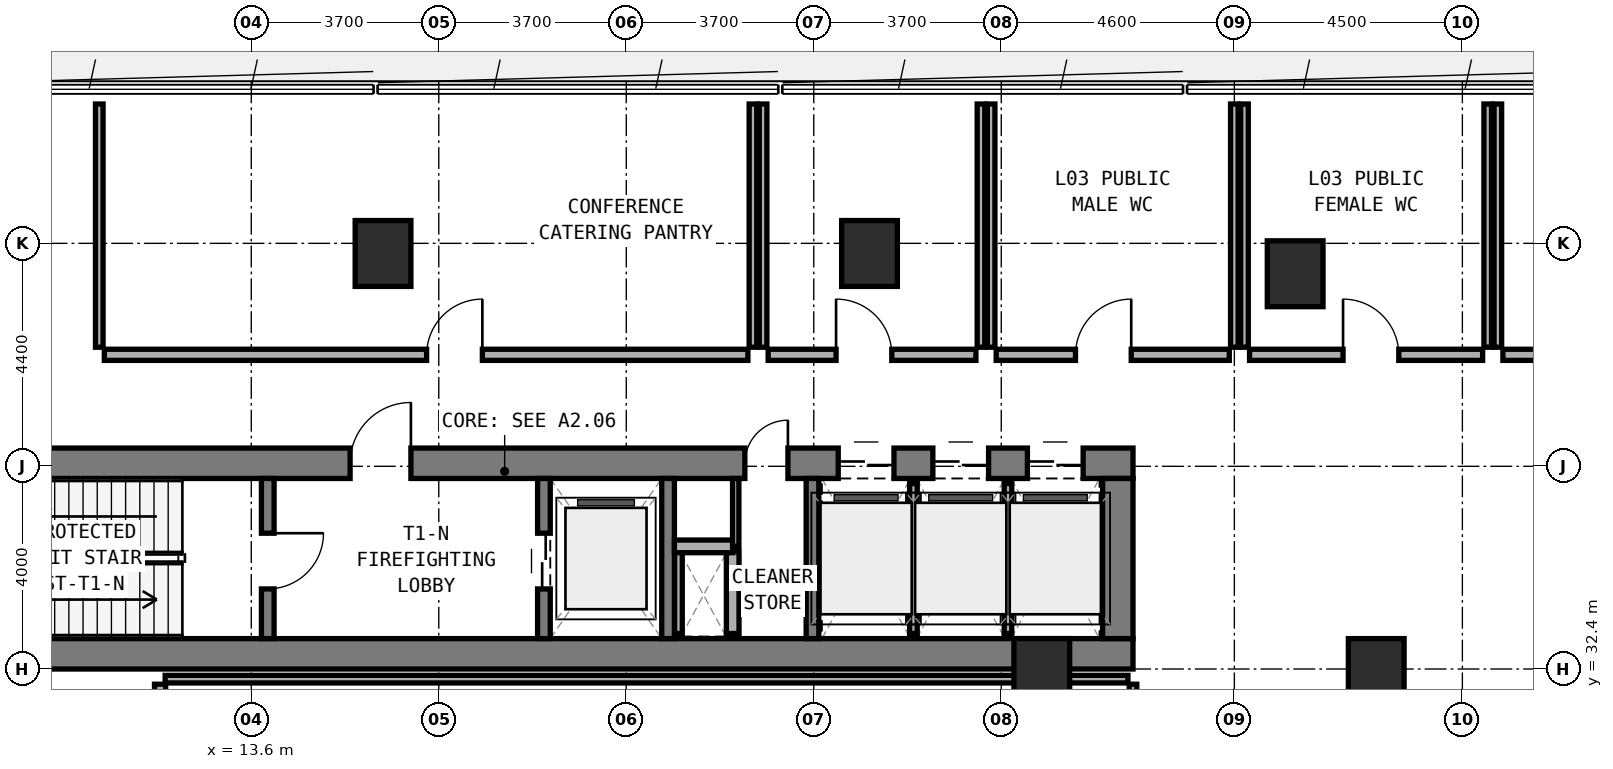
"""IFC4 building model, lengths in metres.
Left out: names, types, materials, properties, quantities, classifications, styles, units other than length and angle.
Written with IfcOpenShell. Run it as: python <this file> out.ifc"""

import sys

from ifc_helpers import new_model, si_unit, direction, frame, frame_2d, origin, origin_2d, place, context, subcontext, project, spatial, rectangle, extrude, element, fill, save


model = new_model("IFC4")
c1 = context("Model", 3, precision=1e-05, world=origin(), true_north=direction((0.0, 1.0)))
c2 = subcontext(c1, "Body", "Model", "MODEL_VIEW")
j1 = project(units=[si_unit("LENGTHUNIT", "METRE"), si_unit("PLANEANGLEUNIT", "RADIAN")], contexts=[c1])
p1 = place(None, origin())
s1 = spatial("IfcSite", under=j1, at=p1, CompositionType="ELEMENT")
p2 = place(p1, origin())
s2 = spatial("IfcBuilding", under=s1, at=p2, CompositionType="ELEMENT")
p3 = place(p2, frame((0.0, 0.0, 15.0)))
s3 = spatial("IfcBuildingStorey", under=s2, at=p3, CompositionType="ELEMENT", Elevation=15.0)
p4 = place(p3, frame((6.2, 32.7, 0.0), z_axis=(0.0, 0.0, 1.0), x_axis=(1.0, 0.0, 0.0)))
e1 = element("IfcWall", 1, at=p4, inside=s3, PredefinedType="SHEAR", context=c2, shape_type="SweptSolid", body=[
    extrude(rectangle(XDim=24.8, YDim=0.6, at=frame_2d((12.4, 0.0))), origin(), (0.0, 0.0, 1.0), 4.5),
])
p5 = place(p3, frame((6.2, 36.46, 0.0), z_axis=(0.0, 0.0, 1.0), x_axis=(1.0, 0.0, 0.0)))
e2 = element("IfcWall", 2, at=p5, inside=s3, PredefinedType="SHEAR", context=c2, shape_type="SweptSolid", body=[
    extrude(rectangle(XDim=24.8, YDim=0.6, at=frame_2d((12.4, 0.0))), origin(), (0.0, 0.0, 1.0), 4.5),
])
p6 = place(p5, frame((9.35, 0.0, 0.0)))
e3 = element("IfcOpeningElement", 3, at=p6, cuts=e2, PredefinedType="OPENING", context=c2, shape_type="SweptSolid", body=[
    extrude(rectangle(XDim=1.2, YDim=2.15, at=frame_2d((0.6, 1.075))), frame((0.0, 0.31, 0.0), z_axis=(0.0, -1.0, 0.0), x_axis=(1.0, 0.0, 0.0)), (0.0, 0.0, 1.0), 0.62),
])
p7 = place(p5, frame((17.14, 0.0, 0.0)))
e4 = element("IfcOpeningElement", 4, at=p7, cuts=e2, PredefinedType="OPENING", context=c2, shape_type="SweptSolid", body=[
    extrude(rectangle(XDim=0.85, YDim=2.1, at=frame_2d((0.425, 1.05))), frame((0.0, 0.31, 0.0), z_axis=(0.0, -1.0, 0.0), x_axis=(1.0, 0.0, 0.0)), (0.0, 0.0, 1.0), 0.62),
])
p8 = place(p5, frame((18.983, 0.0, 0.0)))
e5 = element("IfcOpeningElement", 5, at=p8, cuts=e2, PredefinedType="OPENING", context=c2, shape_type="SweptSolid", body=[
    extrude(rectangle(XDim=1.1, YDim=2.15, at=frame_2d((0.55, 1.075))), frame((0.0, 0.31, 0.0), z_axis=(0.0, -1.0, 0.0), x_axis=(1.0, 0.0, 0.0)), (0.0, 0.0, 1.0), 0.62),
])
p9 = place(p5, frame((20.85, 0.0, 0.0)))
e6 = element("IfcOpeningElement", 6, at=p9, cuts=e2, PredefinedType="OPENING", context=c2, shape_type="SweptSolid", body=[
    extrude(rectangle(XDim=1.1, YDim=2.15, at=frame_2d((0.55, 1.075))), frame((0.0, 0.31, 0.0), z_axis=(0.0, -1.0, 0.0), x_axis=(1.0, 0.0, 0.0)), (0.0, 0.0, 1.0), 0.62),
])
p10 = place(p5, frame((22.716, 0.0, 0.0)))
e7 = element("IfcOpeningElement", 7, at=p10, cuts=e2, PredefinedType="OPENING", context=c2, shape_type="SweptSolid", body=[
    extrude(rectangle(XDim=1.1, YDim=2.15, at=frame_2d((0.55, 1.075))), frame((0.0, 0.31, 0.0), z_axis=(0.0, -1.0, 0.0), x_axis=(1.0, 0.0, 0.0)), (0.0, 0.0, 1.0), 0.62),
])
p11 = place(p3, frame((30.7, 33.0, 0.0), z_axis=(0.0, 0.0, 1.0), x_axis=(0.0, 1.0, 0.0)))
e8 = element("IfcWall", 8, at=p11, inside=s3, PredefinedType="SHEAR", context=c2, shape_type="SweptSolid", body=[
    extrude(rectangle(XDim=3.16, YDim=0.6, at=frame_2d((1.58, 0.0))), origin(), (0.0, 0.0, 1.0), 4.5),
])
p12 = place(p3, frame((13.925, 33.0, 0.0), z_axis=(0.0, 0.0, 1.0), x_axis=(0.0, 1.0, 0.0)))
e9 = element("IfcWall", 9, at=p12, inside=s3, PredefinedType="STANDARD", context=c2, shape_type="SweptSolid", body=[
    extrude(rectangle(XDim=3.16, YDim=0.25, at=frame_2d((1.58, 0.0))), origin(), (0.0, 0.0, 1.0), 4.1),
])
p13 = place(p12, frame((0.98, 0.0, 0.0)))
e10 = element("IfcOpeningElement", 10, at=p13, cuts=e9, PredefinedType="OPENING", context=c2, shape_type="SweptSolid", body=[
    extrude(rectangle(XDim=1.1, YDim=2.15, at=frame_2d((0.55, 1.075))), frame((0.0, 0.135, 0.0), z_axis=(0.0, -1.0, 0.0), x_axis=(1.0, 0.0, 0.0)), (0.0, 0.0, 1.0), 0.27),
])
p14 = place(p3, frame((19.375, 33.0, 0.0), z_axis=(0.0, 0.0, 1.0), x_axis=(0.0, 1.0, 0.0)))
e11 = element("IfcWall", 11, at=p14, inside=s3, PredefinedType="STANDARD", context=c2, shape_type="SweptSolid", body=[
    extrude(rectangle(XDim=3.16, YDim=0.25, at=frame_2d((1.58, 0.0))), origin(), (0.0, 0.0, 1.0), 4.1),
])
p15 = place(p14, frame((0.98, 0.0, 0.0)))
e12 = element("IfcOpeningElement", 12, at=p15, cuts=e11, PredefinedType="OPENING", context=c2, shape_type="SweptSolid", body=[
    extrude(rectangle(XDim=1.1, YDim=2.15, at=frame_2d((0.55, 1.075))), frame((0.0, 0.135, 0.0), z_axis=(0.0, -1.0, 0.0), x_axis=(1.0, 0.0, 0.0)), (0.0, 0.0, 1.0), 0.27),
])
for number, where, z_axis, x_axis in (
    (13, (21.825, 33.0, 0.0), (0.0, 0.0, 1.0), (0.0, 1.0, 0.0)),
    (14, (24.675, 33.0, 0.0), (0.0, 0.0, 1.0), (0.0, 1.0, 0.0)),
):
    element("IfcWall", number, at=place(p3, frame(where, z_axis=z_axis, x_axis=x_axis)), inside=s3, PredefinedType="STANDARD", context=c2, shape_type="SweptSolid", body=[
        extrude(rectangle(XDim=3.16, YDim=0.25, at=frame_2d((1.58, 0.0))), origin(), (0.0, 0.0, 1.0), 4.1),
    ])
for number, where, z_axis, x_axis in (
    (15, (16.2, 40.6, 0.0), (0.0, 0.0, 1.0), (1.0, 0.0, 0.0)),
    (16, (25.8, 40.6, 0.0), (0.0, 0.0, 1.0), (1.0, 0.0, 0.0)),
    (17, (34.2, 40.2, 0.0), (0.0, 0.0, 1.0), (1.0, 0.0, 0.0)),
    (18, (35.8, 32.35, 0.0), (0.0, 0.0, 1.0), (1.0, 0.0, 0.0)),
    (19, (29.2, 32.35, 0.0), (0.0, 0.0, 1.0), (1.0, 0.0, 0.0)),
):
    element("IfcColumn", number, at=place(p3, frame(where, z_axis=z_axis, x_axis=x_axis)), inside=s3, PredefinedType="COLUMN", context=c2, shape_type="SweptSolid", body=[
        extrude(rectangle(XDim=1.1, YDim=1.3, at=origin_2d()), origin(), (0.0, 0.0, 1.0), 4.5),
    ])
p16 = place(p3, frame((22.03, 33.1, 0.0), z_axis=(0.0, 0.0, 1.0), x_axis=(0.0, 1.0, 0.0)))
e20 = element("IfcWall", 20, at=p16, inside=s3, PredefinedType="PARTITIONING", context=c2, shape_type="SweptSolid", body=[
    extrude(rectangle(XDim=1.62, YDim=0.15, at=frame_2d((0.81, 0.0))), origin(), (0.0, 0.0, 1.0), 4.1),
])
p17 = place(p3, frame((23.1, 33.1, 0.0), z_axis=(0.0, 0.0, 1.0), x_axis=(0.0, 1.0, 0.0)))
e21 = element("IfcWall", 21, at=p17, inside=s3, PredefinedType="SOLIDWALL", context=c2, shape_type="SweptSolid", body=[
    extrude(rectangle(XDim=1.62, YDim=0.25, at=frame_2d((0.81, 0.0))), origin(), (0.0, 0.0, 1.0), 4.1),
])
p18 = place(p3, frame((21.95, 34.82, 0.0), z_axis=(0.0, 0.0, 1.0), x_axis=(1.0, 0.0, 0.0)))
e22 = element("IfcWall", 22, at=p18, inside=s3, PredefinedType="SOLIDWALL", context=c2, shape_type="SweptSolid", body=[
    extrude(rectangle(XDim=1.15, YDim=0.25, at=frame_2d((0.575, 0.0))), origin(), (0.0, 0.0, 1.0), 4.1),
])
p19 = place(p3, frame((23.16, 34.82, 0.0), z_axis=(0.0, 0.0, 1.0), x_axis=(0.0, 1.0, 0.0)))
e23 = element("IfcWall", 23, at=p19, inside=s3, PredefinedType="PARTITIONING", context=c2, shape_type="SweptSolid", body=[
    extrude(rectangle(XDim=1.34, YDim=0.125, at=frame_2d((0.67, 0.0))), origin(), (0.0, 0.0, 1.0), 4.1),
])
p20 = place(p3, frame((26.667, 33.1, 0.0), z_axis=(0.0, 0.0, 1.0), x_axis=(0.0, 1.0, 0.0)))
e24 = element("IfcWall", 24, at=p20, inside=s3, PredefinedType="PARTITIONING", context=c2, shape_type="SweptSolid", body=[
    extrude(rectangle(XDim=2.96, YDim=0.15, at=frame_2d((1.48, 0.0))), origin(), (0.0, 0.0, 1.0), 4.1),
])
p21 = place(p3, frame((28.533, 33.1, 0.0), z_axis=(0.0, 0.0, 1.0), x_axis=(0.0, 1.0, 0.0)))
e25 = element("IfcWall", 25, at=p21, inside=s3, PredefinedType="PARTITIONING", context=c2, shape_type="SweptSolid", body=[
    extrude(rectangle(XDim=2.96, YDim=0.15, at=frame_2d((1.48, 0.0))), origin(), (0.0, 0.0, 1.0), 3.175),
])
p22 = place(p3, frame((31.0, 17.9, 0.0), z_axis=(0.0, 0.0, 1.0), x_axis=(0.0, 1.0, 0.0)))
e26 = element("IfcWall", 26, at=p22, inside=s3, PredefinedType="PARTITIONING", context=c2, shape_type="SweptSolid", body=[
    extrude(rectangle(XDim=14.2, YDim=0.15, at=frame_2d((7.1, 0.0))), origin(), (0.0, 0.0, 1.0), 3.175),
])
p23 = place(p3, frame((11.9, 32.2, 0.0), z_axis=(0.0, 0.0, 1.0), x_axis=(1.0, 0.0, 0.0)))
e27 = element("IfcWall", 27, at=p23, inside=s3, PredefinedType="PARTITIONING", context=c2, shape_type="SweptSolid", body=[
    extrude(rectangle(XDim=19.0, YDim=0.15, at=frame_2d((9.5, 0.0))), origin(), (0.0, 0.0, 1.0), 3.175),
])
p24 = place(p3, frame((11.8, 17.9, 0.0), z_axis=(0.0, 0.0, 1.0), x_axis=(0.0, 1.0, 0.0)))
e28 = element("IfcWall", 28, at=p24, inside=s3, PredefinedType="SOLIDWALL", context=c2, shape_type="SweptSolid", body=[
    extrude(rectangle(XDim=14.2, YDim=0.22, at=frame_2d((7.1, 0.0))), origin(), (0.0, 0.0, 1.0), 3.175),
])
p25 = place(p24, frame((5.885, 0.0, 0.0)))
e29 = element("IfcOpeningElement", 29, at=p25, cuts=e28, PredefinedType="OPENING", context=c2, shape_type="SweptSolid", body=[
    extrude(rectangle(XDim=1.1, YDim=2.1, at=frame_2d((0.55, 1.05))), frame((0.0, 0.12, 0.0), z_axis=(0.0, -1.0, 0.0), x_axis=(1.0, 0.0, 0.0)), (0.0, 0.0, 1.0), 0.24),
])
for number, where, z_axis, x_axis in (
    (30, (10.6, 38.75, 0.0), (0.0, 0.0, 1.0), (0.0, 1.0, 0.0)),
    (31, (23.5, 38.75, 0.0), (0.0, 0.0, 1.0), (0.0, 1.0, 0.0)),
):
    element("IfcWall", number, at=place(p3, frame(where, z_axis=z_axis, x_axis=x_axis)), inside=s3, PredefinedType="PARTITIONING", context=c2, shape_type="SweptSolid", body=[
        extrude(rectangle(XDim=4.8, YDim=0.15, at=frame_2d((2.4, 0.0))), origin(), (0.0, 0.0, 1.0), 3.625),
    ])
p26 = place(p3, frame((10.7, 38.6, 0.0), z_axis=(0.0, 0.0, 1.0), x_axis=(1.0, 0.0, 0.0)))
e32 = element("IfcWall", 32, at=p26, inside=s3, PredefinedType="SOLIDWALL", context=c2, shape_type="SweptSolid", body=[
    extrude(rectangle(XDim=12.7, YDim=0.22, at=frame_2d((6.35, 0.0))), origin(), (0.0, 0.0, 1.0), 4.1),
])
p27 = place(p26, frame((6.36, 0.0, 0.0)))
e33 = element("IfcOpeningElement", 33, at=p27, cuts=e32, PredefinedType="OPENING", context=c2, shape_type="SweptSolid", body=[
    extrude(rectangle(XDim=1.1, YDim=2.1, at=frame_2d((0.55, 1.05))), frame((0.0, 0.12, 0.0), z_axis=(0.0, -1.0, 0.0), x_axis=(1.0, 0.0, 0.0)), (0.0, 0.0, 1.0), 0.24),
])
for number, where, z_axis, x_axis in (
    (34, (23.7, 38.75, 0.0), (0.0, 0.0, 1.0), (0.0, 1.0, 0.0)),
    (35, (28.0, 38.75, 0.0), (0.0, 0.0, 1.0), (0.0, 1.0, 0.0)),
):
    element("IfcWall", number, at=place(p3, frame(where, z_axis=z_axis, x_axis=x_axis)), inside=s3, PredefinedType="PARTITIONING", context=c2, shape_type="SweptSolid", body=[
        extrude(rectangle(XDim=4.8, YDim=0.15, at=frame_2d((2.4, 0.0))), origin(), (0.0, 0.0, 1.0), 3.625),
    ])
p28 = place(p3, frame((23.8, 38.6, 0.0), z_axis=(0.0, 0.0, 1.0), x_axis=(1.0, 0.0, 0.0)))
e36 = element("IfcWall", 36, at=p28, inside=s3, PredefinedType="SOLIDWALL", context=c2, shape_type="SweptSolid", body=[
    extrude(rectangle(XDim=4.1, YDim=0.22, at=frame_2d((2.05, 0.0))), origin(), (0.0, 0.0, 1.0), 3.175),
])
p29 = place(p28, frame((1.34, 0.0, 0.0)))
e37 = element("IfcOpeningElement", 37, at=p29, cuts=e36, PredefinedType="OPENING", context=c2, shape_type="SweptSolid", body=[
    extrude(rectangle(XDim=1.1, YDim=2.1, at=frame_2d((0.55, 1.05))), frame((0.0, 0.12, 0.0), z_axis=(0.0, -1.0, 0.0), x_axis=(1.0, 0.0, 0.0)), (0.0, 0.0, 1.0), 0.24),
])
for number, where, z_axis, x_axis in (
    (38, (28.2, 38.75, 0.0), (0.0, 0.0, 1.0), (0.0, 1.0, 0.0)),
    (39, (33.0, 38.75, 0.0), (0.0, 0.0, 1.0), (0.0, 1.0, 0.0)),
):
    element("IfcWall", number, at=place(p3, frame(where, z_axis=z_axis, x_axis=x_axis)), inside=s3, PredefinedType="PARTITIONING", context=c2, shape_type="SweptSolid", body=[
        extrude(rectangle(XDim=4.8, YDim=0.15, at=frame_2d((2.4, 0.0))), origin(), (0.0, 0.0, 1.0), 3.625),
    ])
p30 = place(p3, frame((28.3, 38.6, 0.0), z_axis=(0.0, 0.0, 1.0), x_axis=(1.0, 0.0, 0.0)))
e40 = element("IfcWall", 40, at=p30, inside=s3, PredefinedType="SOLIDWALL", context=c2, shape_type="SweptSolid", body=[
    extrude(rectangle(XDim=4.6, YDim=0.22, at=frame_2d((2.3, 0.0))), origin(), (0.0, 0.0, 1.0), 4.1),
])
p31 = place(p30, frame((1.565, 0.0, 0.0)))
e41 = element("IfcOpeningElement", 41, at=p31, cuts=e40, PredefinedType="OPENING", context=c2, shape_type="SweptSolid", body=[
    extrude(rectangle(XDim=1.1, YDim=2.1, at=frame_2d((0.55, 1.05))), frame((0.0, 0.12, 0.0), z_axis=(0.0, -1.0, 0.0), x_axis=(1.0, 0.0, 0.0)), (0.0, 0.0, 1.0), 0.24),
])
p32 = place(p3, frame((33.2, 38.75, 0.0), z_axis=(0.0, 0.0, 1.0), x_axis=(0.0, 1.0, 0.0)))
e42 = element("IfcWall", 42, at=p32, inside=s3, PredefinedType="PARTITIONING", context=c2, shape_type="SweptSolid", body=[
    extrude(rectangle(XDim=4.8, YDim=0.15, at=frame_2d((2.4, 0.0))), origin(), (0.0, 0.0, 1.0), 3.625),
])
p33 = place(p3, frame((38.0, 38.75, 0.0), z_axis=(0.0, 0.0, 1.0), x_axis=(0.0, 1.0, 0.0)))
e43 = element("IfcWall", 43, at=p33, inside=s3, PredefinedType="PARTITIONING", context=c2, shape_type="SweptSolid", body=[
    extrude(rectangle(XDim=4.8, YDim=0.15, at=frame_2d((2.4, 0.0))), origin(), (0.0, 0.0, 1.0), 4.1),
])
p34 = place(p3, frame((33.3, 38.6, 0.0), z_axis=(0.0, 0.0, 1.0), x_axis=(1.0, 0.0, 0.0)))
e44 = element("IfcWall", 44, at=p34, inside=s3, PredefinedType="SOLIDWALL", context=c2, shape_type="SweptSolid", body=[
    extrude(rectangle(XDim=4.6, YDim=0.22, at=frame_2d((2.3, 0.0))), origin(), (0.0, 0.0, 1.0), 3.625),
])
p35 = place(p34, frame((1.845, 0.0, 0.0)))
e45 = element("IfcOpeningElement", 45, at=p35, cuts=e44, PredefinedType="OPENING", context=c2, shape_type="SweptSolid", body=[
    extrude(rectangle(XDim=1.1, YDim=2.1, at=frame_2d((0.55, 1.05))), frame((0.0, 0.12, 0.0), z_axis=(0.0, -1.0, 0.0), x_axis=(1.0, 0.0, 0.0)), (0.0, 0.0, 1.0), 0.24),
])
p36 = place(p3, frame((38.2, 38.75, 0.0), z_axis=(0.0, 0.0, 1.0), x_axis=(0.0, 1.0, 0.0)))
e46 = element("IfcWall", 46, at=p36, inside=s3, PredefinedType="PARTITIONING", context=c2, shape_type="SweptSolid", body=[
    extrude(rectangle(XDim=4.8, YDim=0.15, at=frame_2d((2.4, 0.0))), origin(), (0.0, 0.0, 1.0), 4.1),
])
p37 = place(p3, frame((38.3, 38.6, 0.0), z_axis=(0.0, 0.0, 1.0), x_axis=(1.0, 0.0, 0.0)))
e47 = element("IfcWall", 47, at=p37, inside=s3, PredefinedType="SOLIDWALL", context=c2, shape_type="SweptSolid", body=[
    extrude(rectangle(XDim=19.1, YDim=0.22, at=frame_2d((9.55, 0.0))), origin(), (0.0, 0.0, 1.0), 3.375),
])
p38 = place(p37, frame((8.09, 0.0, 0.0)))
e48 = element("IfcOpeningElement", 48, at=p38, cuts=e47, PredefinedType="OPENING", context=c2, shape_type="SweptSolid", body=[
    extrude(rectangle(XDim=1.1, YDim=2.1, at=frame_2d((0.55, 1.05))), frame((0.0, 0.12, 0.0), z_axis=(0.0, -1.0, 0.0), x_axis=(1.0, 0.0, 0.0)), (0.0, 0.0, 1.0), 0.24),
])
p39 = place(p13, frame((1.1, 0.0, 0.0), z_axis=(0.0, 0.0, 1.0), x_axis=(-1.0, 0.0, 0.0)))
e49 = element("IfcDoor", 49, at=p39, inside=s3, OperationType="SINGLE_SWING_LEFT", PredefinedType="DOOR", context=c2, shape_type="SweptSolid", body=[
    extrude(rectangle(XDim=1.1, YDim=2.15, at=frame_2d((0.55, 1.075))), frame((0.0, 0.025, 0.0), z_axis=(0.0, -1.0, 0.0), x_axis=(1.0, 0.0, 0.0)), (0.0, 0.0, 1.0), 0.05),
])
fill(e10, e49)
p40 = place(p6, origin())
e50 = element("IfcDoor", 50, at=p40, inside=s3, OperationType="SINGLE_SWING_RIGHT", PredefinedType="DOOR", context=c2, shape_type="SweptSolid", body=[
    extrude(rectangle(XDim=1.2, YDim=2.15, at=frame_2d((0.6, 1.075))), frame((0.0, 0.025, 0.0), z_axis=(0.0, -1.0, 0.0), x_axis=(1.0, 0.0, 0.0)), (0.0, 0.0, 1.0), 0.05),
])
fill(e3, e50)
p41 = place(p15, origin())
e51 = element("IfcDoor", 51, at=p41, inside=s3, OperationType="DOUBLE_DOOR_SLIDING", PredefinedType="DOOR", context=c2, shape_type="SweptSolid", body=[
    extrude(rectangle(XDim=1.1, YDim=2.15, at=frame_2d((0.55, 1.075))), frame((0.0, 0.025, 0.0), z_axis=(0.0, -1.0, 0.0), x_axis=(1.0, 0.0, 0.0)), (0.0, 0.0, 1.0), 0.05),
])
fill(e12, e51)
p42 = place(p7, origin())
e52 = element("IfcDoor", 52, at=p42, inside=s3, OperationType="SINGLE_SWING_RIGHT", PredefinedType="DOOR", context=c2, shape_type="SweptSolid", body=[
    extrude(rectangle(XDim=0.85, YDim=2.1, at=frame_2d((0.425, 1.05))), frame((0.0, 0.025, 0.0), z_axis=(0.0, -1.0, 0.0), x_axis=(1.0, 0.0, 0.0)), (0.0, 0.0, 1.0), 0.05),
])
fill(e4, e52)
p43 = place(p8, origin())
e53 = element("IfcDoor", 53, at=p43, inside=s3, OperationType="DOUBLE_DOOR_SLIDING", PredefinedType="DOOR", context=c2, shape_type="SweptSolid", body=[
    extrude(rectangle(XDim=1.1, YDim=2.15, at=frame_2d((0.55, 1.075))), frame((0.0, 0.025, 0.0), z_axis=(0.0, -1.0, 0.0), x_axis=(1.0, 0.0, 0.0)), (0.0, 0.0, 1.0), 0.05),
])
fill(e5, e53)
p44 = place(p9, origin())
e54 = element("IfcDoor", 54, at=p44, inside=s3, OperationType="DOUBLE_DOOR_SLIDING", PredefinedType="DOOR", context=c2, shape_type="SweptSolid", body=[
    extrude(rectangle(XDim=1.1, YDim=2.15, at=frame_2d((0.55, 1.075))), frame((0.0, 0.025, 0.0), z_axis=(0.0, -1.0, 0.0), x_axis=(1.0, 0.0, 0.0)), (0.0, 0.0, 1.0), 0.05),
])
fill(e6, e54)
p45 = place(p10, origin())
e55 = element("IfcDoor", 55, at=p45, inside=s3, OperationType="DOUBLE_DOOR_SLIDING", PredefinedType="DOOR", context=c2, shape_type="SweptSolid", body=[
    extrude(rectangle(XDim=1.1, YDim=2.15, at=frame_2d((0.55, 1.075))), frame((0.0, 0.025, 0.0), z_axis=(0.0, -1.0, 0.0), x_axis=(1.0, 0.0, 0.0)), (0.0, 0.0, 1.0), 0.05),
])
fill(e7, e55)
p46 = place(p27, origin())
e56 = element("IfcDoor", 56, at=p46, inside=s3, OperationType="SINGLE_SWING_RIGHT", PredefinedType="DOOR", context=c2, shape_type="SweptSolid", body=[
    extrude(rectangle(XDim=1.1, YDim=2.1, at=frame_2d((0.55, 1.05))), frame((0.0, 0.025, 0.0), z_axis=(0.0, -1.0, 0.0), x_axis=(1.0, 0.0, 0.0)), (0.0, 0.0, 1.0), 0.05),
])
fill(e33, e56)
p47 = place(p29, origin())
e57 = element("IfcDoor", 57, at=p47, inside=s3, OperationType="SINGLE_SWING_LEFT", PredefinedType="DOOR", context=c2, shape_type="SweptSolid", body=[
    extrude(rectangle(XDim=1.1, YDim=2.1, at=frame_2d((0.55, 1.05))), frame((0.0, 0.025, 0.0), z_axis=(0.0, -1.0, 0.0), x_axis=(1.0, 0.0, 0.0)), (0.0, 0.0, 1.0), 0.05),
])
fill(e37, e57)
p48 = place(p31, origin())
e58 = element("IfcDoor", 58, at=p48, inside=s3, OperationType="SINGLE_SWING_RIGHT", PredefinedType="DOOR", context=c2, shape_type="SweptSolid", body=[
    extrude(rectangle(XDim=1.1, YDim=2.1, at=frame_2d((0.55, 1.05))), frame((0.0, 0.025, 0.0), z_axis=(0.0, -1.0, 0.0), x_axis=(1.0, 0.0, 0.0)), (0.0, 0.0, 1.0), 0.05),
])
fill(e41, e58)
p49 = place(p35, origin())
e59 = element("IfcDoor", 59, at=p49, inside=s3, OperationType="SINGLE_SWING_LEFT", PredefinedType="DOOR", context=c2, shape_type="SweptSolid", body=[
    extrude(rectangle(XDim=1.1, YDim=2.1, at=frame_2d((0.55, 1.05))), frame((0.0, 0.025, 0.0), z_axis=(0.0, -1.0, 0.0), x_axis=(1.0, 0.0, 0.0)), (0.0, 0.0, 1.0), 0.05),
])
fill(e45, e59)
save(model, sys.argv[1])
